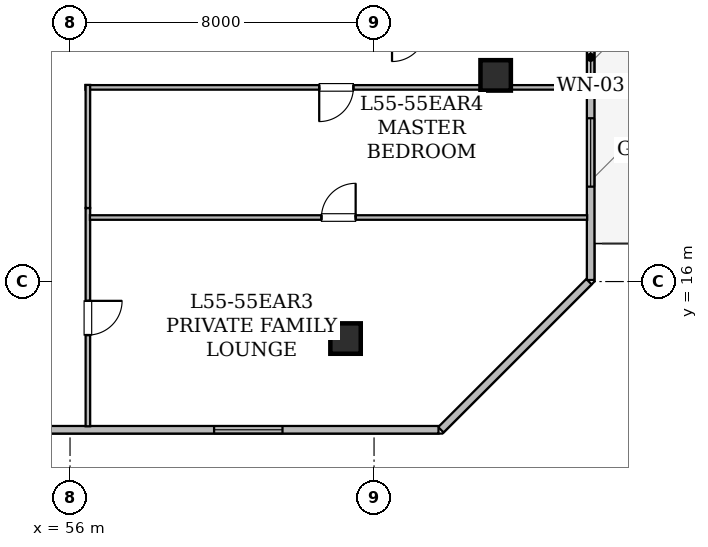
"""IFC4 building model, lengths in metres.
Left out: names, types, materials, properties, quantities, classifications, styles, units other than length and angle.
Written with IfcOpenShell. Run it as: python <this file> out.ifc"""

import sys

from ifc_helpers import new_model, si_unit, direction, frame, frame_2d, origin, origin_2d, place, context, subcontext, project, spatial, rectangle, hollow_rectangle, extrude, element, fill, save


model = new_model("IFC4")
c1 = context("Model", 3, precision=1e-05, world=origin(), true_north=direction((0.0, 1.0)))
c2 = subcontext(c1, "Body", "Model", "MODEL_VIEW")
j1 = project(units=[si_unit("LENGTHUNIT", "METRE"), si_unit("PLANEANGLEUNIT", "RADIAN")], contexts=[c1])
p1 = place(None, origin())
s1 = spatial("IfcSite", under=j1, at=p1, CompositionType="ELEMENT")
p2 = place(p1, origin())
s2 = spatial("IfcBuilding", under=s1, at=p2, CompositionType="ELEMENT")
p3 = place(p2, frame((0.0, 0.0, 217.2)))
s3 = spatial("IfcBuildingStorey", under=s2, at=p3, CompositionType="ELEMENT", Elevation=217.2)
for number, where, z_axis, x_axis in (
    (1, (63.25, 14.5, 0.025), (0.0, 0.0, 1.0), (1.0, 0.0, 0.0)),
    (2, (67.2, 21.425, 0.025), (0.0, 0.0, 1.0), (1.0, 0.0, 0.0)),
):
    element("IfcColumn", number, at=place(p3, frame(where, z_axis=z_axis, x_axis=x_axis)), inside=s3, PredefinedType="COLUMN", context=c2, shape_type="SweptSolid", body=[
        extrude(hollow_rectangle(XDim=0.8, YDim=0.8, WallThickness=0.04, at=origin_2d()), origin(), (0.0, 0.0, 1.0), 3.625),
    ])
p4 = place(p3, frame((69.7, 24.916, 0.0), z_axis=(0.0, 0.0, 1.0), x_axis=(0.0, -1.0, 0.0)))
e3 = element("IfcWall", 3, at=p4, inside=s3, PredefinedType="STANDARD", context=c2, shape_type="SweptSolid", body=[
    extrude(rectangle(XDim=8.875, YDim=0.2, at=frame_2d((4.438, 0.0))), origin(), (0.0, 0.0, 1.0), 3.43),
])
p5 = place(p4, frame((0.866, 0.0, 0.0)))
e4 = element("IfcOpeningElement", 4, at=p5, cuts=e3, PredefinedType="OPENING", context=c2, shape_type="SweptSolid", body=[
    extrude(rectangle(XDim=1.1, YDim=2.2, at=frame_2d((0.55, 1.1))), frame((0.0, 0.11, 0.0), z_axis=(0.0, -1.0, 0.0), x_axis=(1.0, 0.0, 0.0)), (0.0, 0.0, 1.0), 0.22),
])
p6 = place(p4, frame((2.417, 0.0, 0.78)))
e5 = element("IfcOpeningElement", 5, at=p6, cuts=e3, PredefinedType="OPENING", context=c2, shape_type="SweptSolid", body=[
    extrude(rectangle(XDim=1.2, YDim=1.5, at=frame_2d((0.6, 0.75))), frame((0.0, 0.11, 0.0), z_axis=(0.0, -1.0, 0.0), x_axis=(1.0, 0.0, 0.0)), (0.0, 0.0, 1.0), 0.22),
])
p7 = place(p4, frame((4.619, 0.0, 0.85)))
e6 = element("IfcOpeningElement", 6, at=p7, cuts=e3, PredefinedType="OPENING", context=c2, shape_type="SweptSolid", body=[
    extrude(rectangle(XDim=1.8, YDim=0.92, at=frame_2d((0.9, 0.46))), frame((0.0, 0.11, 0.0), z_axis=(0.0, -1.0, 0.0), x_axis=(1.0, 0.0, 0.0)), (0.0, 0.0, 1.0), 0.22),
])
p8 = place(p3, frame((69.655, 15.996, 0.0), z_axis=(0.0, 0.0, 1.0), x_axis=(-0.707106781187, -0.707106781187, 0.0)))
e7 = element("IfcWall", 7, at=p8, inside=s3, PredefinedType="STANDARD", context=c2, shape_type="SweptSolid", body=[
    extrude(rectangle(XDim=5.51, YDim=0.2, at=frame_2d((2.755, 0.0))), origin(), (0.0, 0.0, 1.0), 3.43),
])
p9 = place(p3, frame((65.696, 12.1, 0.0), z_axis=(0.0, 0.0, 1.0), x_axis=(-1.0, 0.0, 0.0)))
e8 = element("IfcWall", 8, at=p9, inside=s3, PredefinedType="STANDARD", context=c2, shape_type="SweptSolid", body=[
    extrude(rectangle(XDim=41.393, YDim=0.2, at=frame_2d((20.697, 0.0))), origin(), (0.0, 0.0, 1.0), 3.43),
])
p10 = place(p9, frame((39.085, 0.0, 0.85)))
e9 = element("IfcOpeningElement", 9, at=p10, cuts=e8, PredefinedType="OPENING", context=c2, shape_type="SweptSolid", body=[
    extrude(rectangle(XDim=1.8, YDim=0.92, at=frame_2d((0.9, 0.46))), frame((0.0, 0.11, 0.0), z_axis=(0.0, -1.0, 0.0), x_axis=(1.0, 0.0, 0.0)), (0.0, 0.0, 1.0), 0.22),
])
p11 = place(p9, frame((30.571, 0.0, 0.85)))
e10 = element("IfcOpeningElement", 10, at=p11, cuts=e8, PredefinedType="OPENING", context=c2, shape_type="SweptSolid", body=[
    extrude(rectangle(XDim=1.8, YDim=0.92, at=frame_2d((0.9, 0.46))), frame((0.0, 0.11, 0.0), z_axis=(0.0, -1.0, 0.0), x_axis=(1.0, 0.0, 0.0)), (0.0, 0.0, 1.0), 0.22),
])
p12 = place(p9, frame((25.264, 0.0, 0.85)))
e11 = element("IfcOpeningElement", 11, at=p12, cuts=e8, PredefinedType="OPENING", context=c2, shape_type="SweptSolid", body=[
    extrude(rectangle(XDim=1.8, YDim=0.92, at=frame_2d((0.9, 0.46))), frame((0.0, 0.11, 0.0), z_axis=(0.0, -1.0, 0.0), x_axis=(1.0, 0.0, 0.0)), (0.0, 0.0, 1.0), 0.22),
])
p13 = place(p9, frame((16.538, 0.0, 0.85)))
e12 = element("IfcOpeningElement", 12, at=p13, cuts=e8, PredefinedType="OPENING", context=c2, shape_type="SweptSolid", body=[
    extrude(rectangle(XDim=1.8, YDim=0.92, at=frame_2d((0.9, 0.46))), frame((0.0, 0.11, 0.0), z_axis=(0.0, -1.0, 0.0), x_axis=(1.0, 0.0, 0.0)), (0.0, 0.0, 1.0), 0.22),
])
p14 = place(p9, frame((4.105, 0.0, 0.85)))
e13 = element("IfcOpeningElement", 13, at=p14, cuts=e8, PredefinedType="OPENING", context=c2, shape_type="SweptSolid", body=[
    extrude(rectangle(XDim=1.8, YDim=0.92, at=frame_2d((0.9, 0.46))), frame((0.0, 0.11, 0.0), z_axis=(0.0, -1.0, 0.0), x_axis=(1.0, 0.0, 0.0)), (0.0, 0.0, 1.0), 0.22),
])
p15 = place(p3, frame((56.47, 17.935, 0.0), z_axis=(0.0, 0.0, 1.0), x_axis=(0.0, -1.0, 0.0)))
e14 = element("IfcWall", 14, at=p15, inside=s3, PredefinedType="PARTITIONING", context=c2, shape_type="SweptSolid", body=[
    extrude(rectangle(XDim=5.743, YDim=0.12, at=frame_2d((2.872, 0.0))), origin(), (0.0, 0.0, 1.0), 2.725),
])
p16 = place(p15, frame((2.443, 0.0, 0.0)))
e15 = element("IfcOpeningElement", 15, at=p16, cuts=e14, PredefinedType="OPENING", context=c2, shape_type="SweptSolid", body=[
    extrude(rectangle(XDim=0.9, YDim=2.1, at=frame_2d((0.45, 1.05))), frame((0.0, 0.07, 0.0), z_axis=(0.0, -1.0, 0.0), x_axis=(1.0, 0.0, 0.0)), (0.0, 0.0, 1.0), 0.14),
])
p17 = place(p3, frame((69.608, 21.109, 0.0), z_axis=(0.0, 0.0, 1.0), x_axis=(-1.0, 0.0, 0.0)))
e16 = element("IfcWall", 16, at=p17, inside=s3, PredefinedType="PARTITIONING", context=c2, shape_type="SweptSolid", body=[
    extrude(rectangle(XDim=13.203, YDim=0.12, at=frame_2d((6.602, 0.0))), origin(), (0.0, 0.0, 1.0), 2.725),
])
p18 = place(p17, frame((6.151, 0.0, 0.0)))
e17 = element("IfcOpeningElement", 17, at=p18, cuts=e16, PredefinedType="OPENING", context=c2, shape_type="SweptSolid", body=[
    extrude(rectangle(XDim=0.9, YDim=2.1, at=frame_2d((0.45, 1.05))), frame((0.0, 0.07, 0.0), z_axis=(0.0, -1.0, 0.0), x_axis=(1.0, 0.0, 0.0)), (0.0, 0.0, 1.0), 0.14),
])
p19 = place(p3, frame((56.47, 21.174, 0.0), z_axis=(0.0, 0.0, 1.0), x_axis=(0.0, -1.0, 0.0)))
e18 = element("IfcWall", 18, at=p19, inside=s3, PredefinedType="PARTITIONING", context=c2, shape_type="SweptSolid", body=[
    extrude(rectangle(XDim=3.239, YDim=0.12, at=frame_2d((1.62, 0.0))), origin(), (0.0, 0.0, 1.0), 2.725),
])
p20 = place(p3, frame((56.524, 17.685, 0.0), z_axis=(0.0, 0.0, 1.0), x_axis=(1.0, 0.0, 0.0)))
e19 = element("IfcWall", 19, at=p20, inside=s3, PredefinedType="PARTITIONING", context=c2, shape_type="SweptSolid", body=[
    extrude(rectangle(XDim=13.084, YDim=0.12, at=frame_2d((6.542, 0.0))), origin(), (0.0, 0.0, 1.0), 2.887),
])
p21 = place(p20, frame((6.092, 0.0, 0.0)))
e20 = element("IfcOpeningElement", 20, at=p21, cuts=e19, PredefinedType="OPENING", context=c2, shape_type="SweptSolid", body=[
    extrude(rectangle(XDim=0.9, YDim=2.1, at=frame_2d((0.45, 1.05))), frame((0.0, 0.07, 0.0), z_axis=(0.0, -1.0, 0.0), x_axis=(1.0, 0.0, 0.0)), (0.0, 0.0, 1.0), 0.14),
])
p22 = place(p6, origin())
e21 = element("IfcWindow", 21, at=p22, inside=s3, PartitioningType="SINGLE_PANEL", PredefinedType="WINDOW", context=c2, shape_type="SweptSolid", body=[
    extrude(rectangle(XDim=1.2, YDim=1.5, at=frame_2d((0.6, 0.75))), frame((0.0, 0.03, 0.0), z_axis=(0.0, -1.0, 0.0), x_axis=(1.0, 0.0, 0.0)), (0.0, 0.0, 1.0), 0.06),
])
fill(e5, e21)
p23 = place(p14, origin())
e22 = element("IfcWindow", 22, at=p23, inside=s3, PartitioningType="SINGLE_PANEL", PredefinedType="WINDOW", context=c2, shape_type="SweptSolid", body=[
    extrude(rectangle(XDim=1.8, YDim=0.92, at=frame_2d((0.9, 0.46))), frame((0.0, 0.03, 0.0), z_axis=(0.0, -1.0, 0.0), x_axis=(1.0, 0.0, 0.0)), (0.0, 0.0, 1.0), 0.06),
])
fill(e13, e22)
p24 = place(p7, origin())
e23 = element("IfcWindow", 23, at=p24, inside=s3, PartitioningType="SINGLE_PANEL", PredefinedType="WINDOW", context=c2, shape_type="SweptSolid", body=[
    extrude(rectangle(XDim=1.8, YDim=0.92, at=frame_2d((0.9, 0.46))), frame((0.0, 0.03, 0.0), z_axis=(0.0, -1.0, 0.0), x_axis=(1.0, 0.0, 0.0)), (0.0, 0.0, 1.0), 0.06),
])
fill(e6, e23)
p25 = place(p16, origin())
e24 = element("IfcDoor", 24, at=p25, inside=s3, OperationType="SINGLE_SWING_LEFT", PredefinedType="DOOR", context=c2, shape_type="SweptSolid", body=[
    extrude(rectangle(XDim=0.9, YDim=2.1, at=frame_2d((0.45, 1.05))), frame((0.0, 0.025, 0.0), z_axis=(0.0, -1.0, 0.0), x_axis=(1.0, 0.0, 0.0)), (0.0, 0.0, 1.0), 0.05),
])
fill(e15, e24)
p26 = place(p18, origin())
e25 = element("IfcDoor", 25, at=p26, inside=s3, OperationType="SINGLE_SWING_RIGHT", PredefinedType="DOOR", context=c2, shape_type="SweptSolid", body=[
    extrude(rectangle(XDim=0.9, YDim=2.1, at=frame_2d((0.45, 1.05))), frame((0.0, 0.025, 0.0), z_axis=(0.0, -1.0, 0.0), x_axis=(1.0, 0.0, 0.0)), (0.0, 0.0, 1.0), 0.05),
])
fill(e17, e25)
p27 = place(p21, origin())
e26 = element("IfcDoor", 26, at=p27, inside=s3, OperationType="SINGLE_SWING_RIGHT", PredefinedType="DOOR", context=c2, shape_type="SweptSolid", body=[
    extrude(rectangle(XDim=0.9, YDim=2.1, at=frame_2d((0.45, 1.05))), frame((0.0, 0.025, 0.0), z_axis=(0.0, -1.0, 0.0), x_axis=(1.0, 0.0, 0.0)), (0.0, 0.0, 1.0), 0.05),
])
fill(e20, e26)
save(model, sys.argv[1])
